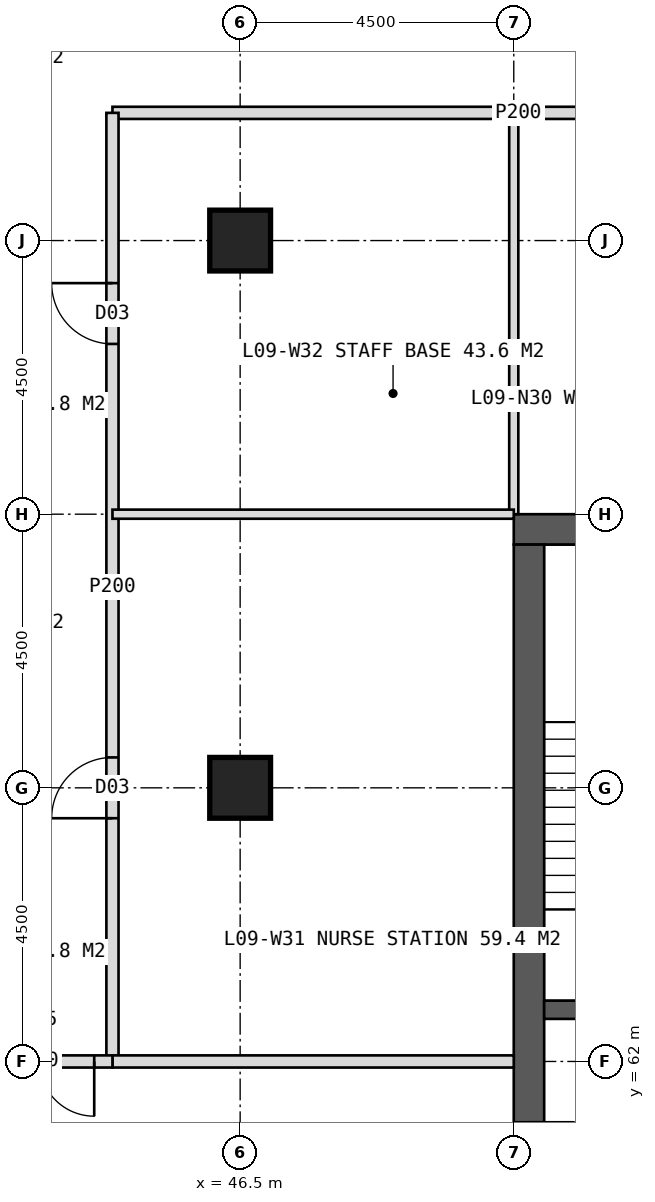
"""IFC4 building model, lengths in metres.
Left out: names, types, materials, properties, quantities, classifications, styles, units other than length and angle.
Written with IfcOpenShell. Run it as: python <this file> out.ifc"""

import sys

from ifc_helpers import new_model, si_unit, direction, frame, frame_2d, origin, origin_2d, place, context, subcontext, project, spatial, rectangle, hollow_rectangle, extrude, element, fill, save


model = new_model("IFC4")
c1 = context("Model", 3, precision=1e-05, world=origin(), true_north=direction((0.0, 1.0)))
c2 = subcontext(c1, "Body", "Model", "MODEL_VIEW")
j1 = project(units=[si_unit("LENGTHUNIT", "METRE"), si_unit("PLANEANGLEUNIT", "RADIAN")], contexts=[c1])
p1 = place(None, origin())
s1 = spatial("IfcSite", under=j1, at=p1, CompositionType="ELEMENT")
p2 = place(p1, origin())
s2 = spatial("IfcBuilding", under=s1, at=p2, CompositionType="ELEMENT")
p3 = place(p2, frame((0.0, 0.0, 43.0)))
s3 = spatial("IfcBuildingStorey", under=s2, at=p3, CompositionType="ELEMENT", Elevation=43.0)
p4 = place(p3, frame((51.0, 70.75, 0.0), z_axis=(0.0, 0.0, 1.0), x_axis=(1.0, 0.0, 0.0)))
e1 = element("IfcWall", 1, at=p4, inside=s3, PredefinedType="SHEAR", context=c2, shape_type="SweptSolid", body=[
    extrude(rectangle(XDim=18.0, YDim=0.5, at=frame_2d((9.0, 0.0))), origin(), (0.0, 0.0, 1.0), 4.0),
])
p5 = place(p4, frame((8.1, 0.0, 0.0)))
e2 = element("IfcOpeningElement", 2, at=p5, cuts=e1, PredefinedType="OPENING", context=c2, shape_type="SweptSolid", body=[
    extrude(rectangle(XDim=1.8, YDim=2.2, at=frame_2d((0.9, 1.1))), frame((0.0, 0.26, 0.0), z_axis=(0.0, -1.0, 0.0), x_axis=(1.0, 0.0, 0.0)), (0.0, 0.0, 1.0), 0.52),
])
p6 = place(p3, frame((51.25, 53.5, 0.0), z_axis=(0.0, 0.0, 1.0), x_axis=(0.0, 1.0, 0.0)))
e3 = element("IfcWall", 3, at=p6, inside=s3, PredefinedType="SHEAR", context=c2, shape_type="SweptSolid", body=[
    extrude(rectangle(XDim=17.0, YDim=0.5, at=frame_2d((8.5, 0.0))), origin(), (0.0, 0.0, 1.0), 4.0),
])
p7 = place(p6, frame((6.0, 0.0, 0.0)))
e4 = element("IfcOpeningElement", 4, at=p7, cuts=e3, PredefinedType="OPENING", context=c2, shape_type="SweptSolid", body=[
    extrude(rectangle(XDim=1.5, YDim=2.2, at=frame_2d((0.75, 1.1))), frame((0.0, 0.26, 0.0), z_axis=(0.0, -1.0, 0.0), x_axis=(1.0, 0.0, 0.0)), (0.0, 0.0, 1.0), 0.52),
])
p8 = place(p3, frame((51.5, 62.85, 0.0), z_axis=(0.0, 0.0, 1.0), x_axis=(1.0, 0.0, 0.0)))
e5 = element("IfcWall", 5, at=p8, inside=s3, PredefinedType="SHEAR", context=c2, shape_type="SweptSolid", body=[
    extrude(rectangle(XDim=3.3, YDim=0.3, at=frame_2d((1.65, 0.0))), origin(), (0.0, 0.0, 1.0), 4.0),
])
p9 = place(p8, frame((1.05, 0.0, 0.0)))
e6 = element("IfcOpeningElement", 6, at=p9, cuts=e5, PredefinedType="OPENING", context=c2, shape_type="SweptSolid", body=[
    extrude(rectangle(XDim=1.2, YDim=2.1, at=frame_2d((0.6, 1.05))), frame((0.0, 0.16, 0.0), z_axis=(0.0, -1.0, 0.0), x_axis=(1.0, 0.0, 0.0)), (0.0, 0.0, 1.0), 0.32),
])
for number, where, z_axis, x_axis in (
    (7, (46.5, 75.5, 0.0), (0.0, 0.0, 1.0), (1.0, 0.0, 0.0)),
    (8, (46.5, 66.5, 0.0), (0.0, 0.0, 1.0), (1.0, 0.0, 0.0)),
):
    element("IfcColumn", number, at=place(p3, frame(where, z_axis=z_axis, x_axis=x_axis)), inside=s3, PredefinedType="COLUMN", context=c2, shape_type="SweptSolid", body=[
        extrude(hollow_rectangle(XDim=1.0, YDim=1.0, WallThickness=0.1, at=origin_2d()), origin(), (0.0, 0.0, 1.0), 4.0),
    ])
p10 = place(p3, frame((51.0, 71.0, 0.0), z_axis=(0.0, 0.0, 1.0), x_axis=(0.0, 1.0, 0.0)))
e9 = element("IfcWall", 9, at=p10, inside=s3, PredefinedType="PARTITIONING", context=c2, shape_type="SweptSolid", body=[
    extrude(rectangle(XDim=6.6, YDim=0.15, at=frame_2d((3.3, 0.0))), origin(), (0.0, 0.0, 1.0), 3.75),
])
p11 = place(p3, frame((44.4, 77.6, 0.0), z_axis=(0.0, 0.0, 1.0), x_axis=(1.0, 0.0, 0.0)))
e10 = element("IfcWall", 10, at=p11, inside=s3, PredefinedType="PARTITIONING", context=c2, shape_type="SweptSolid", body=[
    extrude(rectangle(XDim=13.35, YDim=0.2, at=frame_2d((6.675, 0.0))), origin(), (0.0, 0.0, 1.0), 3.75),
])
p12 = place(p11, frame((9.475, 0.0, 0.0)))
e11 = element("IfcOpeningElement", 11, at=p12, cuts=e10, PredefinedType="OPENING", context=c2, shape_type="SweptSolid", body=[
    extrude(rectangle(XDim=1.0, YDim=2.1, at=frame_2d((0.5, 1.05))), frame((0.0, 0.11, 0.0), z_axis=(0.0, -1.0, 0.0), x_axis=(1.0, 0.0, 0.0)), (0.0, 0.0, 1.0), 0.22),
])
p13 = place(p3, frame((44.4, 62.0, 0.0), z_axis=(0.0, 0.0, 1.0), x_axis=(0.0, 1.0, 0.0)))
e12 = element("IfcWall", 12, at=p13, inside=s3, PredefinedType="PARTITIONING", context=c2, shape_type="SweptSolid", body=[
    extrude(rectangle(XDim=15.6, YDim=0.2, at=frame_2d((7.8, 0.0))), origin(), (0.0, 0.0, 1.0), 3.75),
])
p14 = place(p13, frame((4.0, 0.0, 0.0)))
e13 = element("IfcOpeningElement", 13, at=p14, cuts=e12, PredefinedType="OPENING", context=c2, shape_type="SweptSolid", body=[
    extrude(rectangle(XDim=1.0, YDim=2.1, at=frame_2d((0.5, 1.05))), frame((0.0, 0.11, 0.0), z_axis=(0.0, -1.0, 0.0), x_axis=(1.0, 0.0, 0.0)), (0.0, 0.0, 1.0), 0.22),
])
p15 = place(p13, frame((11.8, 0.0, 0.0)))
e14 = element("IfcOpeningElement", 14, at=p15, cuts=e12, PredefinedType="OPENING", context=c2, shape_type="SweptSolid", body=[
    extrude(rectangle(XDim=1.0, YDim=2.1, at=frame_2d((0.5, 1.05))), frame((0.0, 0.11, 0.0), z_axis=(0.0, -1.0, 0.0), x_axis=(1.0, 0.0, 0.0)), (0.0, 0.0, 1.0), 0.22),
])
p16 = place(p3, frame((51.0, 62.0, 0.0), z_axis=(0.0, 0.0, 1.0), x_axis=(-1.0, 0.0, 0.0)))
e15 = element("IfcWall", 15, at=p16, inside=s3, PredefinedType="SOLIDWALL", context=c2, shape_type="SweptSolid", body=[
    extrude(rectangle(XDim=6.6, YDim=0.2, at=frame_2d((3.3, 0.0))), origin(), (0.0, 0.0, 1.0), 2.75),
])
p17 = place(p3, frame((51.0, 71.0, 0.0), z_axis=(0.0, 0.0, 1.0), x_axis=(-1.0, 0.0, 0.0)))
e16 = element("IfcWall", 16, at=p17, inside=s3, PredefinedType="PARTITIONING", context=c2, shape_type="SweptSolid", body=[
    extrude(rectangle(XDim=6.6, YDim=0.15, at=frame_2d((3.3, 0.0))), origin(), (0.0, 0.0, 1.0), 3.75),
])
p18 = place(p3, frame((44.4, 62.0, 0.0), z_axis=(0.0, 0.0, 1.0), x_axis=(-1.0, 0.0, 0.0)))
e17 = element("IfcWall", 17, at=p18, inside=s3, PredefinedType="SOLIDWALL", context=c2, shape_type="SweptSolid", body=[
    extrude(rectangle(XDim=2.7, YDim=0.2, at=frame_2d((1.35, 0.0))), origin(), (0.0, 0.0, 1.0), 2.75),
])
p19 = place(p18, frame((0.3, 0.0, 0.0)))
e18 = element("IfcOpeningElement", 18, at=p19, cuts=e17, PredefinedType="OPENING", context=c2, shape_type="SweptSolid", body=[
    extrude(rectangle(XDim=1.8, YDim=2.2, at=frame_2d((0.9, 1.1))), frame((0.0, 0.11, 0.0), z_axis=(0.0, -1.0, 0.0), x_axis=(1.0, 0.0, 0.0)), (0.0, 0.0, 1.0), 0.22),
])
p20 = place(p14, origin())
e19 = element("IfcDoor", 19, at=p20, inside=s3, OperationType="SINGLE_SWING_LEFT", PredefinedType="DOOR", context=c2, shape_type="SweptSolid", body=[
    extrude(rectangle(XDim=1.0, YDim=2.1, at=frame_2d((0.5, 1.05))), frame((0.0, 0.025, 0.0), z_axis=(0.0, -1.0, 0.0), x_axis=(1.0, 0.0, 0.0)), (0.0, 0.0, 1.0), 0.05),
])
fill(e13, e19)
p21 = place(p15, origin())
e20 = element("IfcDoor", 20, at=p21, inside=s3, OperationType="SINGLE_SWING_RIGHT", PredefinedType="DOOR", context=c2, shape_type="SweptSolid", body=[
    extrude(rectangle(XDim=1.0, YDim=2.1, at=frame_2d((0.5, 1.05))), frame((0.0, 0.025, 0.0), z_axis=(0.0, -1.0, 0.0), x_axis=(1.0, 0.0, 0.0)), (0.0, 0.0, 1.0), 0.05),
])
fill(e14, e20)
p22 = place(p19, origin())
e21 = element("IfcDoor", 21, at=p22, inside=s3, OperationType="DOUBLE_DOOR_DOUBLE_SWING", PredefinedType="DOOR", context=c2, shape_type="SweptSolid", body=[
    extrude(rectangle(XDim=1.8, YDim=2.2, at=frame_2d((0.9, 1.1))), frame((0.0, 0.025, 0.0), z_axis=(0.0, -1.0, 0.0), x_axis=(1.0, 0.0, 0.0)), (0.0, 0.0, 1.0), 0.05),
])
fill(e18, e21)
save(model, sys.argv[1])
